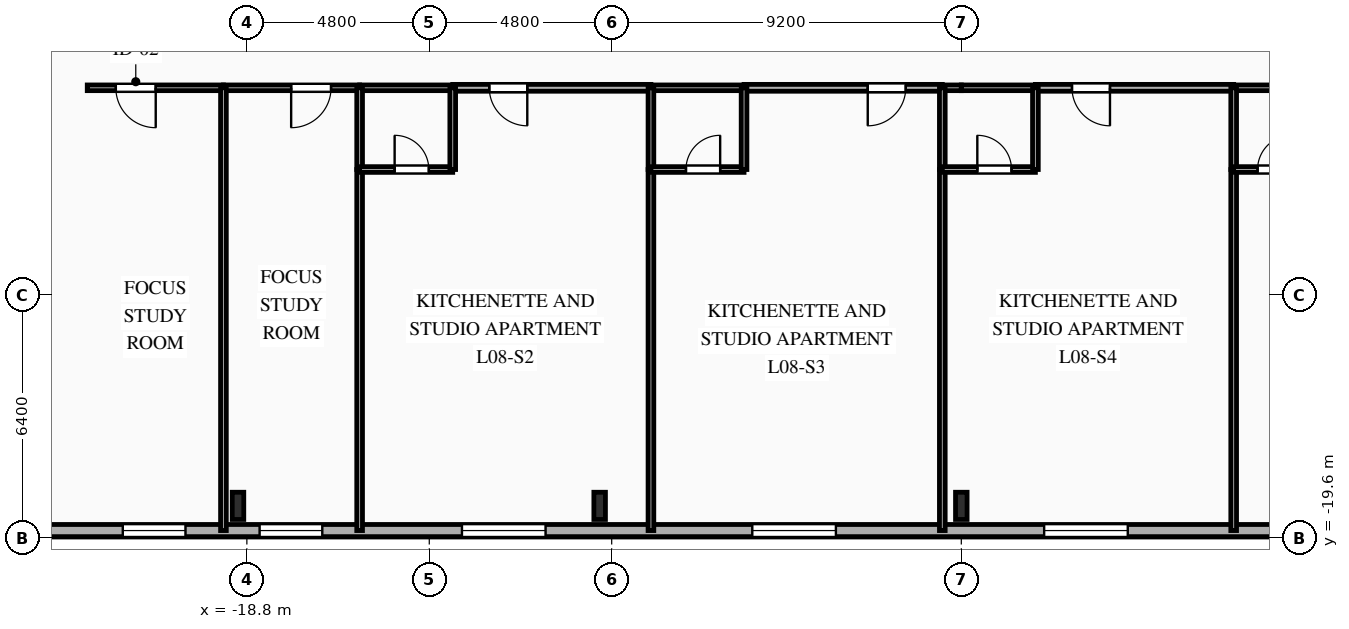
"""IFC4 building model, lengths in metres.
Left out: names, types, materials, properties, quantities, classifications, styles, units other than length and angle.
Written with IfcOpenShell. Run it as: python <this file> out.ifc"""

import sys

from ifc_helpers import new_model, si_unit, direction, frame, frame_2d, origin, origin_2d, place, context, subcontext, project, spatial, rectangle, i_section, extrude, element, fill, save


model = new_model("IFC4")
c1 = context("Model", 3, precision=1e-05, world=origin(), true_north=direction((0.0, 1.0)))
c2 = subcontext(c1, "Body", "Model", "MODEL_VIEW")
j1 = project(units=[si_unit("LENGTHUNIT", "METRE"), si_unit("PLANEANGLEUNIT", "RADIAN")], contexts=[c1])
p1 = place(None, origin())
s1 = spatial("IfcSite", under=j1, at=p1, CompositionType="ELEMENT")
p2 = place(p1, origin())
s2 = spatial("IfcBuilding", under=s1, at=p2, CompositionType="ELEMENT")
p3 = place(p2, frame((0.0, 0.0, 33.7)))
s3 = spatial("IfcBuildingStorey", under=s2, at=p3, CompositionType="ELEMENT", Elevation=33.7)
for number, where, z_axis, x_axis in (
    (1, (-19.033, -18.75, 0.0), (0.0, 0.0, 1.0), (1.0, 0.0, 0.0)),
    (2, (-9.517, -18.75, 0.0), (0.0, 0.0, 1.0), (1.0, 0.0, 0.0)),
    (3, (0.0, -18.75, 0.0), (0.0, 0.0, 1.0), (1.0, 0.0, 0.0)),
):
    element("IfcColumn", number, at=place(p3, frame(where, z_axis=z_axis, x_axis=x_axis)), inside=s3, PredefinedType="COLUMN", context=c2, shape_type="SweptSolid", body=[
        extrude(i_section(OverallWidth=0.304, OverallDepth=0.716, WebThickness=0.021, FlangeThickness=0.04, FilletRadius=0.027, at=origin_2d()), origin(), (0.0, 0.0, 1.0), 3.35),
    ])
p4 = place(p3, frame((29.2, -19.4, 0.0), z_axis=(0.0, 0.0, 1.0), x_axis=(-1.0, 0.0, 0.0)))
e4 = element("IfcWall", 4, at=p4, inside=s3, PredefinedType="SOLIDWALL", context=c2, shape_type="SweptSolid", body=[
    extrude(rectangle(XDim=58.4, YDim=0.32, at=frame_2d((29.2, 0.0))), origin(), (0.0, 0.0, 1.0), 3.035),
])
p5 = place(p4, frame((7.455, 0.0, 0.85)))
e5 = element("IfcOpeningElement", 5, at=p5, cuts=e4, PredefinedType="OPENING", context=c2, shape_type="SweptSolid", body=[
    extrude(rectangle(XDim=1.65, YDim=1.85, at=frame_2d((0.825, 0.925))), frame((0.0, 0.17, 0.0), z_axis=(0.0, -1.0, 0.0), x_axis=(1.0, 0.0, 0.0)), (0.0, 0.0, 1.0), 0.34),
])
p6 = place(p4, frame((11.535, 0.0, 0.85)))
e6 = element("IfcOpeningElement", 6, at=p6, cuts=e4, PredefinedType="OPENING", context=c2, shape_type="SweptSolid", body=[
    extrude(rectangle(XDim=1.65, YDim=1.85, at=frame_2d((0.825, 0.925))), frame((0.0, 0.17, 0.0), z_axis=(0.0, -1.0, 0.0), x_axis=(1.0, 0.0, 0.0)), (0.0, 0.0, 1.0), 0.34),
])
p7 = place(p4, frame((17.14, 0.0, 0.85)))
e7 = element("IfcOpeningElement", 7, at=p7, cuts=e4, PredefinedType="OPENING", context=c2, shape_type="SweptSolid", body=[
    extrude(rectangle(XDim=2.2, YDim=1.85, at=frame_2d((1.1, 0.925))), frame((0.0, 0.17, 0.0), z_axis=(0.0, -1.0, 0.0), x_axis=(1.0, 0.0, 0.0)), (0.0, 0.0, 1.0), 0.34),
])
p8 = place(p4, frame((24.82, 0.0, 0.85)))
e8 = element("IfcOpeningElement", 8, at=p8, cuts=e4, PredefinedType="OPENING", context=c2, shape_type="SweptSolid", body=[
    extrude(rectangle(XDim=2.2, YDim=1.85, at=frame_2d((1.1, 0.925))), frame((0.0, 0.17, 0.0), z_axis=(0.0, -1.0, 0.0), x_axis=(1.0, 0.0, 0.0)), (0.0, 0.0, 1.0), 0.34),
])
p9 = place(p4, frame((32.5, 0.0, 0.85)))
e9 = element("IfcOpeningElement", 9, at=p9, cuts=e4, PredefinedType="OPENING", context=c2, shape_type="SweptSolid", body=[
    extrude(rectangle(XDim=2.2, YDim=1.85, at=frame_2d((1.1, 0.925))), frame((0.0, 0.17, 0.0), z_axis=(0.0, -1.0, 0.0), x_axis=(1.0, 0.0, 0.0)), (0.0, 0.0, 1.0), 0.34),
])
p10 = place(p4, frame((40.14, 0.0, 0.85)))
e10 = element("IfcOpeningElement", 10, at=p10, cuts=e4, PredefinedType="OPENING", context=c2, shape_type="SweptSolid", body=[
    extrude(rectangle(XDim=2.2, YDim=1.85, at=frame_2d((1.1, 0.925))), frame((0.0, 0.17, 0.0), z_axis=(0.0, -1.0, 0.0), x_axis=(1.0, 0.0, 0.0)), (0.0, 0.0, 1.0), 0.34),
])
p11 = place(p4, frame((46.015, 0.0, 0.85)))
e11 = element("IfcOpeningElement", 11, at=p11, cuts=e4, PredefinedType="OPENING", context=c2, shape_type="SweptSolid", body=[
    extrude(rectangle(XDim=1.65, YDim=1.85, at=frame_2d((0.825, 0.925))), frame((0.0, 0.17, 0.0), z_axis=(0.0, -1.0, 0.0), x_axis=(1.0, 0.0, 0.0)), (0.0, 0.0, 1.0), 0.34),
])
p12 = place(p4, frame((49.615, 0.0, 0.85)))
e12 = element("IfcOpeningElement", 12, at=p12, cuts=e4, PredefinedType="OPENING", context=c2, shape_type="SweptSolid", body=[
    extrude(rectangle(XDim=1.65, YDim=1.85, at=frame_2d((0.825, 0.925))), frame((0.0, 0.17, 0.0), z_axis=(0.0, -1.0, 0.0), x_axis=(1.0, 0.0, 0.0)), (0.0, 0.0, 1.0), 0.34),
])
p13 = place(p3, frame((-19.417, -7.75, 0.0), z_axis=(0.0, 0.0, 1.0), x_axis=(-1.0, 0.0, 0.0)))
e13 = element("IfcWall", 13, at=p13, inside=s3, PredefinedType="PARTITIONING", context=c2, shape_type="SweptSolid", body=[
    extrude(rectangle(XDim=3.583, YDim=0.15, at=frame_2d((1.792, 0.0))), origin(), (0.0, 0.0, 1.0), 3.035),
])
p14 = place(p13, frame((1.782, 0.0, 0.0)))
e14 = element("IfcOpeningElement", 14, at=p14, cuts=e13, PredefinedType="OPENING", context=c2, shape_type="SweptSolid", body=[
    extrude(rectangle(XDim=1.05, YDim=2.15, at=frame_2d((0.525, 1.075))), frame((0.0, 0.085, 0.0), z_axis=(0.0, -1.0, 0.0), x_axis=(1.0, 0.0, 0.0)), (0.0, 0.0, 1.0), 0.17),
])
p15 = place(p3, frame((-15.833, -7.75, 0.0), z_axis=(0.0, 0.0, 1.0), x_axis=(-1.0, 0.0, 0.0)))
e15 = element("IfcWall", 15, at=p15, inside=s3, PredefinedType="PARTITIONING", context=c2, shape_type="SweptSolid", body=[
    extrude(rectangle(XDim=3.583, YDim=0.15, at=frame_2d((1.792, 0.0))), origin(), (0.0, 0.0, 1.0), 3.035),
])
p16 = place(p15, frame((0.752, 0.0, 0.0)))
e16 = element("IfcOpeningElement", 16, at=p16, cuts=e15, PredefinedType="OPENING", context=c2, shape_type="SweptSolid", body=[
    extrude(rectangle(XDim=1.05, YDim=2.15, at=frame_2d((0.525, 1.075))), frame((0.0, 0.085, 0.0), z_axis=(0.0, -1.0, 0.0), x_axis=(1.0, 0.0, 0.0)), (0.0, 0.0, 1.0), 0.17),
])
p17 = place(p3, frame((-8.167, -7.75, 0.0), z_axis=(0.0, 0.0, 1.0), x_axis=(-1.0, 0.0, 0.0)))
e17 = element("IfcWall", 17, at=p17, inside=s3, PredefinedType="PARTITIONING", context=c2, shape_type="SweptSolid", body=[
    extrude(rectangle(XDim=5.216, YDim=0.18, at=frame_2d((2.608, 0.0))), origin(), (0.0, 0.0, 1.0), 3.035),
])
p18 = place(p17, frame((3.254, 0.0, 0.0)))
e18 = element("IfcOpeningElement", 18, at=p18, cuts=e17, PredefinedType="OPENING", context=c2, shape_type="SweptSolid", body=[
    extrude(rectangle(XDim=1.0, YDim=2.15, at=frame_2d((0.5, 1.075))), frame((0.0, 0.1, 0.0), z_axis=(0.0, -1.0, 0.0), x_axis=(1.0, 0.0, 0.0)), (0.0, 0.0, 1.0), 0.2),
])
p19 = place(p3, frame((-13.383, -7.75, 0.0), z_axis=(0.0, 0.0, 1.0), x_axis=(-1.0, 0.0, 0.0)))
e19 = element("IfcWall", 19, at=p19, inside=s3, PredefinedType="PLUMBINGWALL", context=c2, shape_type="SweptSolid", body=[
    extrude(rectangle(XDim=2.45, YDim=0.15, at=frame_2d((1.225, 0.0))), origin(), (0.0, 0.0, 1.0), 3.035),
])
p20 = place(p3, frame((-0.5, -7.75, 0.0), z_axis=(0.0, 0.0, 1.0), x_axis=(-1.0, 0.0, 0.0)))
e20 = element("IfcWall", 20, at=p20, inside=s3, PredefinedType="PARTITIONING", context=c2, shape_type="SweptSolid", body=[
    extrude(rectangle(XDim=5.217, YDim=0.18, at=frame_2d((2.608, 0.0))), origin(), (0.0, 0.0, 1.0), 3.035),
])
p21 = place(p20, frame((0.962, 0.0, 0.0)))
e21 = element("IfcOpeningElement", 21, at=p21, cuts=e20, PredefinedType="OPENING", context=c2, shape_type="SweptSolid", body=[
    extrude(rectangle(XDim=1.0, YDim=2.15, at=frame_2d((0.5, 1.075))), frame((0.0, 0.1, 0.0), z_axis=(0.0, -1.0, 0.0), x_axis=(1.0, 0.0, 0.0)), (0.0, 0.0, 1.0), 0.2),
])
p22 = place(p3, frame((-5.717, -7.75, 0.0), z_axis=(0.0, 0.0, 1.0), x_axis=(-1.0, 0.0, 0.0)))
e22 = element("IfcWall", 22, at=p22, inside=s3, PredefinedType="PLUMBINGWALL", context=c2, shape_type="SweptSolid", body=[
    extrude(rectangle(XDim=2.45, YDim=0.15, at=frame_2d((1.225, 0.0))), origin(), (0.0, 0.0, 1.0), 3.035),
])
p23 = place(p3, frame((0.0, -7.75, 0.0), z_axis=(0.0, 0.0, 1.0), x_axis=(-1.0, 0.0, 0.0)))
e23 = element("IfcWall", 23, at=p23, inside=s3, PredefinedType="PLUMBINGWALL", context=c2, shape_type="SweptSolid", body=[
    extrude(rectangle(XDim=0.5, YDim=0.15, at=frame_2d((0.25, 0.0))), origin(), (0.0, 0.0, 1.0), 3.035),
])
p24 = place(p3, frame((7.167, -7.75, 0.0), z_axis=(0.0, 0.0, 1.0), x_axis=(-1.0, 0.0, 0.0)))
e24 = element("IfcWall", 24, at=p24, inside=s3, PredefinedType="PARTITIONING", context=c2, shape_type="SweptSolid", body=[
    extrude(rectangle(XDim=5.217, YDim=0.18, at=frame_2d((2.608, 0.0))), origin(), (0.0, 0.0, 1.0), 3.035),
])
p25 = place(p24, frame((3.255, 0.0, 0.0)))
e25 = element("IfcOpeningElement", 25, at=p25, cuts=e24, PredefinedType="OPENING", context=c2, shape_type="SweptSolid", body=[
    extrude(rectangle(XDim=1.0, YDim=2.15, at=frame_2d((0.5, 1.075))), frame((0.0, 0.1, 0.0), z_axis=(0.0, -1.0, 0.0), x_axis=(1.0, 0.0, 0.0)), (0.0, 0.0, 1.0), 0.2),
])
p26 = place(p3, frame((1.95, -7.75, 0.0), z_axis=(0.0, 0.0, 1.0), x_axis=(-1.0, 0.0, 0.0)))
e26 = element("IfcWall", 26, at=p26, inside=s3, PredefinedType="PLUMBINGWALL", context=c2, shape_type="SweptSolid", body=[
    extrude(rectangle(XDim=1.95, YDim=0.15, at=frame_2d((0.975, 0.0))), origin(), (0.0, 0.0, 1.0), 3.035),
])
p27 = place(p3, frame((9.617, -7.75, 0.0), z_axis=(0.0, 0.0, 1.0), x_axis=(-1.0, 0.0, 0.0)))
e27 = element("IfcWall", 27, at=p27, inside=s3, PredefinedType="PLUMBINGWALL", context=c2, shape_type="SweptSolid", body=[
    extrude(rectangle(XDim=2.45, YDim=0.15, at=frame_2d((1.225, 0.0))), origin(), (0.0, 0.0, 1.0), 3.035),
])
p28 = place(p3, frame((-19.417, -7.75, 0.0), z_axis=(0.0, 0.0, 1.0), x_axis=(0.0, -1.0, 0.0)))
e28 = element("IfcWall", 28, at=p28, inside=s3, PredefinedType="PARTITIONING", context=c2, shape_type="SweptSolid", body=[
    extrude(rectangle(XDim=11.65, YDim=0.15, at=frame_2d((5.825, 0.0))), origin(), (0.0, 0.0, 1.0), 3.035),
])
p29 = place(p3, frame((-15.833, -9.9, 0.0), z_axis=(0.0, 0.0, 1.0), x_axis=(0.0, -1.0, 0.0)))
e29 = element("IfcWall", 29, at=p29, inside=s3, PredefinedType="PARTITIONING", context=c2, shape_type="SweptSolid", body=[
    extrude(rectangle(XDim=9.5, YDim=0.15, at=frame_2d((4.75, 0.0))), origin(), (0.0, 0.0, 1.0), 3.035),
])
p30 = place(p3, frame((-15.833, -7.75, 0.0), z_axis=(0.0, 0.0, 1.0), x_axis=(0.0, -1.0, 0.0)))
e30 = element("IfcWall", 30, at=p30, inside=s3, PredefinedType="PLUMBINGWALL", context=c2, shape_type="SweptSolid", body=[
    extrude(rectangle(XDim=2.15, YDim=0.15, at=frame_2d((1.075, 0.0))), origin(), (0.0, 0.0, 1.0), 3.035),
])
p31 = place(p3, frame((-15.833, -9.9, 0.0), z_axis=(0.0, 0.0, 1.0), x_axis=(1.0, 0.0, 0.0)))
e31 = element("IfcWall", 31, at=p31, inside=s3, PredefinedType="PLUMBINGWALL", context=c2, shape_type="SweptSolid", body=[
    extrude(rectangle(XDim=2.45, YDim=0.15, at=frame_2d((1.225, 0.0))), origin(), (0.0, 0.0, 1.0), 3.035),
])
p32 = place(p31, frame((0.921, 0.0, 0.0)))
e32 = element("IfcOpeningElement", 32, at=p32, cuts=e31, PredefinedType="OPENING", context=c2, shape_type="SweptSolid", body=[
    extrude(rectangle(XDim=0.9, YDim=2.1, at=frame_2d((0.45, 1.05))), frame((0.0, 0.085, 0.0), z_axis=(0.0, -1.0, 0.0), x_axis=(1.0, 0.0, 0.0)), (0.0, 0.0, 1.0), 0.17),
])
p33 = place(p3, frame((-13.383, -9.9, 0.0), z_axis=(0.0, 0.0, 1.0), x_axis=(0.0, 1.0, 0.0)))
e33 = element("IfcWall", 33, at=p33, inside=s3, PredefinedType="PLUMBINGWALL", context=c2, shape_type="SweptSolid", body=[
    extrude(rectangle(XDim=2.15, YDim=0.15, at=frame_2d((1.075, 0.0))), origin(), (0.0, 0.0, 1.0), 3.035),
])
p34 = place(p3, frame((-8.167, -9.9, 0.0), z_axis=(0.0, 0.0, 1.0), x_axis=(0.0, -1.0, 0.0)))
e34 = element("IfcWall", 34, at=p34, inside=s3, PredefinedType="PARTITIONING", context=c2, shape_type="SweptSolid", body=[
    extrude(rectangle(XDim=9.5, YDim=0.15, at=frame_2d((4.75, 0.0))), origin(), (0.0, 0.0, 1.0), 3.035),
])
p35 = place(p3, frame((-8.167, -7.75, 0.0), z_axis=(0.0, 0.0, 1.0), x_axis=(0.0, -1.0, 0.0)))
e35 = element("IfcWall", 35, at=p35, inside=s3, PredefinedType="PLUMBINGWALL", context=c2, shape_type="SweptSolid", body=[
    extrude(rectangle(XDim=2.15, YDim=0.15, at=frame_2d((1.075, 0.0))), origin(), (0.0, 0.0, 1.0), 3.035),
])
p36 = place(p3, frame((-8.167, -9.9, 0.0), z_axis=(0.0, 0.0, 1.0), x_axis=(1.0, 0.0, 0.0)))
e36 = element("IfcWall", 36, at=p36, inside=s3, PredefinedType="PLUMBINGWALL", context=c2, shape_type="SweptSolid", body=[
    extrude(rectangle(XDim=2.45, YDim=0.15, at=frame_2d((1.225, 0.0))), origin(), (0.0, 0.0, 1.0), 3.035),
])
p37 = place(p36, frame((0.921, 0.0, 0.0)))
e37 = element("IfcOpeningElement", 37, at=p37, cuts=e36, PredefinedType="OPENING", context=c2, shape_type="SweptSolid", body=[
    extrude(rectangle(XDim=0.9, YDim=2.1, at=frame_2d((0.45, 1.05))), frame((0.0, 0.085, 0.0), z_axis=(0.0, -1.0, 0.0), x_axis=(1.0, 0.0, 0.0)), (0.0, 0.0, 1.0), 0.17),
])
p38 = place(p3, frame((-5.717, -9.9, 0.0), z_axis=(0.0, 0.0, 1.0), x_axis=(0.0, 1.0, 0.0)))
e38 = element("IfcWall", 38, at=p38, inside=s3, PredefinedType="PLUMBINGWALL", context=c2, shape_type="SweptSolid", body=[
    extrude(rectangle(XDim=2.15, YDim=0.15, at=frame_2d((1.075, 0.0))), origin(), (0.0, 0.0, 1.0), 3.035),
])
p39 = place(p3, frame((-0.5, -9.9, 0.0), z_axis=(0.0, 0.0, 1.0), x_axis=(0.0, -1.0, 0.0)))
e39 = element("IfcWall", 39, at=p39, inside=s3, PredefinedType="PARTITIONING", context=c2, shape_type="SweptSolid", body=[
    extrude(rectangle(XDim=9.5, YDim=0.15, at=frame_2d((4.75, 0.0))), origin(), (0.0, 0.0, 1.0), 3.035),
])
p40 = place(p3, frame((-0.5, -7.75, 0.0), z_axis=(0.0, 0.0, 1.0), x_axis=(0.0, -1.0, 0.0)))
e40 = element("IfcWall", 40, at=p40, inside=s3, PredefinedType="PLUMBINGWALL", context=c2, shape_type="SweptSolid", body=[
    extrude(rectangle(XDim=2.15, YDim=0.15, at=frame_2d((1.075, 0.0))), origin(), (0.0, 0.0, 1.0), 3.035),
])
p41 = place(p3, frame((-0.5, -9.9, 0.0), z_axis=(0.0, 0.0, 1.0), x_axis=(1.0, 0.0, 0.0)))
e41 = element("IfcWall", 41, at=p41, inside=s3, PredefinedType="PLUMBINGWALL", context=c2, shape_type="SweptSolid", body=[
    extrude(rectangle(XDim=2.45, YDim=0.15, at=frame_2d((1.225, 0.0))), origin(), (0.0, 0.0, 1.0), 3.035),
])
p42 = place(p41, frame((0.921, 0.0, 0.0)))
e42 = element("IfcOpeningElement", 42, at=p42, cuts=e41, PredefinedType="OPENING", context=c2, shape_type="SweptSolid", body=[
    extrude(rectangle(XDim=0.9, YDim=2.1, at=frame_2d((0.45, 1.05))), frame((0.0, 0.085, 0.0), z_axis=(0.0, -1.0, 0.0), x_axis=(1.0, 0.0, 0.0)), (0.0, 0.0, 1.0), 0.17),
])
p43 = place(p3, frame((1.95, -9.9, 0.0), z_axis=(0.0, 0.0, 1.0), x_axis=(0.0, 1.0, 0.0)))
e43 = element("IfcWall", 43, at=p43, inside=s3, PredefinedType="PLUMBINGWALL", context=c2, shape_type="SweptSolid", body=[
    extrude(rectangle(XDim=2.15, YDim=0.15, at=frame_2d((1.075, 0.0))), origin(), (0.0, 0.0, 1.0), 3.035),
])
p44 = place(p3, frame((7.167, -9.9, 0.0), z_axis=(0.0, 0.0, 1.0), x_axis=(0.0, -1.0, 0.0)))
e44 = element("IfcWall", 44, at=p44, inside=s3, PredefinedType="PARTITIONING", context=c2, shape_type="SweptSolid", body=[
    extrude(rectangle(XDim=9.5, YDim=0.15, at=frame_2d((4.75, 0.0))), origin(), (0.0, 0.0, 1.0), 3.035),
])
p45 = place(p3, frame((7.167, -7.75, 0.0), z_axis=(0.0, 0.0, 1.0), x_axis=(0.0, -1.0, 0.0)))
e45 = element("IfcWall", 45, at=p45, inside=s3, PredefinedType="PLUMBINGWALL", context=c2, shape_type="SweptSolid", body=[
    extrude(rectangle(XDim=2.15, YDim=0.15, at=frame_2d((1.075, 0.0))), origin(), (0.0, 0.0, 1.0), 3.035),
])
p46 = place(p3, frame((7.167, -9.9, 0.0), z_axis=(0.0, 0.0, 1.0), x_axis=(1.0, 0.0, 0.0)))
e46 = element("IfcWall", 46, at=p46, inside=s3, PredefinedType="PLUMBINGWALL", context=c2, shape_type="SweptSolid", body=[
    extrude(rectangle(XDim=2.45, YDim=0.15, at=frame_2d((1.225, 0.0))), origin(), (0.0, 0.0, 1.0), 3.035),
])
p47 = place(p46, frame((0.629, 0.0, 0.0)))
e47 = element("IfcOpeningElement", 47, at=p47, cuts=e46, PredefinedType="OPENING", context=c2, shape_type="SweptSolid", body=[
    extrude(rectangle(XDim=0.9, YDim=2.1, at=frame_2d((0.45, 1.05))), frame((0.0, 0.085, 0.0), z_axis=(0.0, -1.0, 0.0), x_axis=(1.0, 0.0, 0.0)), (0.0, 0.0, 1.0), 0.17),
])
p48 = place(p8, origin())
e48 = element("IfcWindow", 48, at=p48, inside=s3, PartitioningType="SINGLE_PANEL", PredefinedType="WINDOW", context=c2, shape_type="SweptSolid", body=[
    extrude(rectangle(XDim=2.2, YDim=1.85, at=frame_2d((1.1, 0.925))), frame((0.0, 0.03, 0.0), z_axis=(0.0, -1.0, 0.0), x_axis=(1.0, 0.0, 0.0)), (0.0, 0.0, 1.0), 0.06),
])
fill(e8, e48)
p49 = place(p9, origin())
e49 = element("IfcWindow", 49, at=p49, inside=s3, PartitioningType="SINGLE_PANEL", PredefinedType="WINDOW", context=c2, shape_type="SweptSolid", body=[
    extrude(rectangle(XDim=2.2, YDim=1.85, at=frame_2d((1.1, 0.925))), frame((0.0, 0.03, 0.0), z_axis=(0.0, -1.0, 0.0), x_axis=(1.0, 0.0, 0.0)), (0.0, 0.0, 1.0), 0.06),
])
fill(e9, e49)
p50 = place(p10, origin())
e50 = element("IfcWindow", 50, at=p50, inside=s3, PartitioningType="SINGLE_PANEL", PredefinedType="WINDOW", context=c2, shape_type="SweptSolid", body=[
    extrude(rectangle(XDim=2.2, YDim=1.85, at=frame_2d((1.1, 0.925))), frame((0.0, 0.03, 0.0), z_axis=(0.0, -1.0, 0.0), x_axis=(1.0, 0.0, 0.0)), (0.0, 0.0, 1.0), 0.06),
])
fill(e10, e50)
p51 = place(p11, origin())
e51 = element("IfcWindow", 51, at=p51, inside=s3, PartitioningType="SINGLE_PANEL", PredefinedType="WINDOW", context=c2, shape_type="SweptSolid", body=[
    extrude(rectangle(XDim=1.65, YDim=1.85, at=frame_2d((0.825, 0.925))), frame((0.0, 0.03, 0.0), z_axis=(0.0, -1.0, 0.0), x_axis=(1.0, 0.0, 0.0)), (0.0, 0.0, 1.0), 0.06),
])
fill(e11, e51)
p52 = place(p12, origin())
e52 = element("IfcWindow", 52, at=p52, inside=s3, PartitioningType="SINGLE_PANEL", PredefinedType="WINDOW", context=c2, shape_type="SweptSolid", body=[
    extrude(rectangle(XDim=1.65, YDim=1.85, at=frame_2d((0.825, 0.925))), frame((0.0, 0.03, 0.0), z_axis=(0.0, -1.0, 0.0), x_axis=(1.0, 0.0, 0.0)), (0.0, 0.0, 1.0), 0.06),
])
fill(e12, e52)
p53 = place(p14, origin())
e53 = element("IfcDoor", 53, at=p53, inside=s3, OperationType="SINGLE_SWING_LEFT", PredefinedType="DOOR", context=c2, shape_type="SweptSolid", body=[
    extrude(rectangle(XDim=1.05, YDim=2.15, at=frame_2d((0.525, 1.075))), frame((0.0, 0.025, 0.0), z_axis=(0.0, -1.0, 0.0), x_axis=(1.0, 0.0, 0.0)), (0.0, 0.0, 1.0), 0.05),
])
fill(e14, e53)
p54 = place(p16, origin())
e54 = element("IfcDoor", 54, at=p54, inside=s3, OperationType="SINGLE_SWING_RIGHT", PredefinedType="DOOR", context=c2, shape_type="SweptSolid", body=[
    extrude(rectangle(XDim=1.05, YDim=2.15, at=frame_2d((0.525, 1.075))), frame((0.0, 0.025, 0.0), z_axis=(0.0, -1.0, 0.0), x_axis=(1.0, 0.0, 0.0)), (0.0, 0.0, 1.0), 0.05),
])
fill(e16, e54)
p55 = place(p18, origin())
e55 = element("IfcDoor", 55, at=p55, inside=s3, OperationType="SINGLE_SWING_LEFT", PredefinedType="DOOR", context=c2, shape_type="SweptSolid", body=[
    extrude(rectangle(XDim=1.0, YDim=2.15, at=frame_2d((0.5, 1.075))), frame((0.0, 0.025, 0.0), z_axis=(0.0, -1.0, 0.0), x_axis=(1.0, 0.0, 0.0)), (0.0, 0.0, 1.0), 0.05),
])
fill(e18, e55)
p56 = place(p21, origin())
e56 = element("IfcDoor", 56, at=p56, inside=s3, OperationType="SINGLE_SWING_RIGHT", PredefinedType="DOOR", context=c2, shape_type="SweptSolid", body=[
    extrude(rectangle(XDim=1.0, YDim=2.15, at=frame_2d((0.5, 1.075))), frame((0.0, 0.025, 0.0), z_axis=(0.0, -1.0, 0.0), x_axis=(1.0, 0.0, 0.0)), (0.0, 0.0, 1.0), 0.05),
])
fill(e21, e56)
p57 = place(p25, origin())
e57 = element("IfcDoor", 57, at=p57, inside=s3, OperationType="SINGLE_SWING_LEFT", PredefinedType="DOOR", context=c2, shape_type="SweptSolid", body=[
    extrude(rectangle(XDim=1.0, YDim=2.15, at=frame_2d((0.5, 1.075))), frame((0.0, 0.025, 0.0), z_axis=(0.0, -1.0, 0.0), x_axis=(1.0, 0.0, 0.0)), (0.0, 0.0, 1.0), 0.05),
])
fill(e25, e57)
p58 = place(p32, origin())
e58 = element("IfcDoor", 58, at=p58, inside=s3, OperationType="SINGLE_SWING_LEFT", PredefinedType="DOOR", context=c2, shape_type="SweptSolid", body=[
    extrude(rectangle(XDim=0.9, YDim=2.1, at=frame_2d((0.45, 1.05))), frame((0.0, 0.025, 0.0), z_axis=(0.0, -1.0, 0.0), x_axis=(1.0, 0.0, 0.0)), (0.0, 0.0, 1.0), 0.05),
])
fill(e32, e58)
p59 = place(p37, origin())
e59 = element("IfcDoor", 59, at=p59, inside=s3, OperationType="SINGLE_SWING_RIGHT", PredefinedType="DOOR", context=c2, shape_type="SweptSolid", body=[
    extrude(rectangle(XDim=0.9, YDim=2.1, at=frame_2d((0.45, 1.05))), frame((0.0, 0.025, 0.0), z_axis=(0.0, -1.0, 0.0), x_axis=(1.0, 0.0, 0.0)), (0.0, 0.0, 1.0), 0.05),
])
fill(e37, e59)
p60 = place(p42, origin())
e60 = element("IfcDoor", 60, at=p60, inside=s3, OperationType="SINGLE_SWING_LEFT", PredefinedType="DOOR", context=c2, shape_type="SweptSolid", body=[
    extrude(rectangle(XDim=0.9, YDim=2.1, at=frame_2d((0.45, 1.05))), frame((0.0, 0.025, 0.0), z_axis=(0.0, -1.0, 0.0), x_axis=(1.0, 0.0, 0.0)), (0.0, 0.0, 1.0), 0.05),
])
fill(e42, e60)
p61 = place(p47, origin())
e61 = element("IfcDoor", 61, at=p61, inside=s3, OperationType="SINGLE_SWING_RIGHT", PredefinedType="DOOR", context=c2, shape_type="SweptSolid", body=[
    extrude(rectangle(XDim=0.9, YDim=2.1, at=frame_2d((0.45, 1.05))), frame((0.0, 0.025, 0.0), z_axis=(0.0, -1.0, 0.0), x_axis=(1.0, 0.0, 0.0)), (0.0, 0.0, 1.0), 0.05),
])
fill(e47, e61)
save(model, sys.argv[1])
